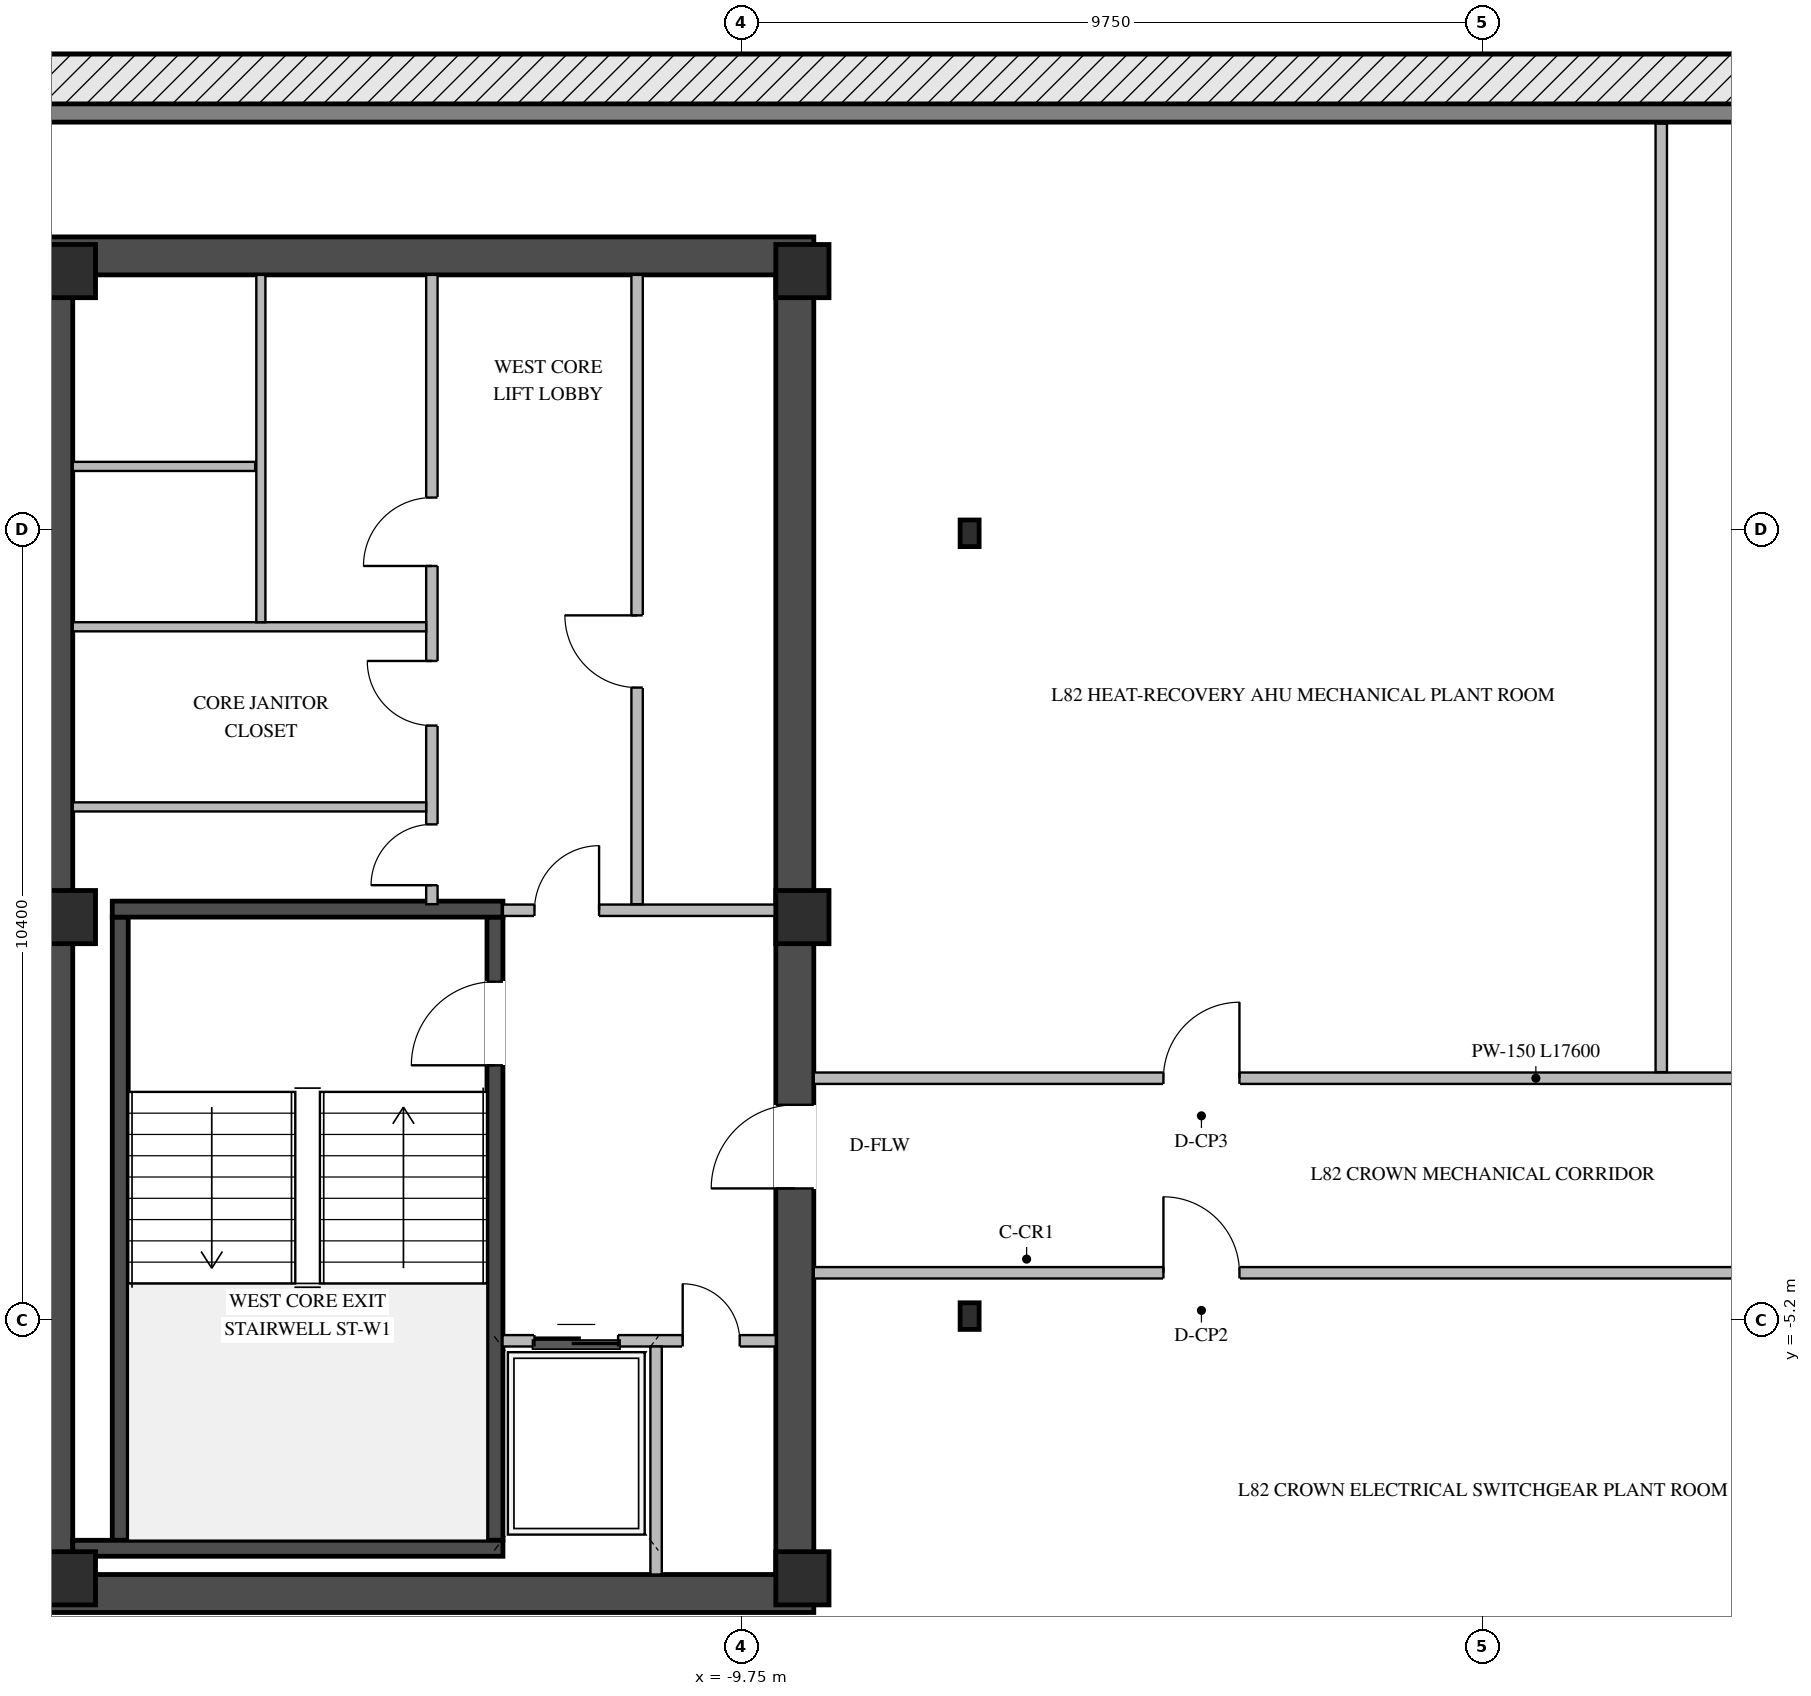
"""IFC4 building model, lengths in metres.
Left out: names, types, materials, properties, quantities, classifications, styles, units other than length and angle.
Written with IfcOpenShell. Run it as: python <this file> out.ifc"""

import sys

from ifc_helpers import new_model, si_unit, direction, frame, frame_2d, origin, origin_2d, place, context, subcontext, project, spatial, rectangle, i_section, extrude, element, fill, save


model = new_model("IFC4")
c1 = context("Model", 3, precision=1e-05, world=origin(), true_north=direction((0.0, 1.0)))
c2 = subcontext(c1, "Body", "Model", "MODEL_VIEW")
j1 = project(units=[si_unit("LENGTHUNIT", "METRE"), si_unit("PLANEANGLEUNIT", "RADIAN")], contexts=[c1])
p1 = place(None, origin())
s1 = spatial("IfcSite", under=j1, at=p1, CompositionType="ELEMENT")
p2 = place(p1, origin())
s2 = spatial("IfcBuilding", under=s1, at=p2, CompositionType="ELEMENT")
p3 = place(p2, frame((0.0, 0.0, 301.35)))
s3 = spatial("IfcBuildingStorey", under=s2, at=p3, CompositionType="ELEMENT", Elevation=301.35)
for number, where, z_axis, x_axis in (
    (1, (-19.05, -8.8, 0.0), (0.0, 0.0, 1.0), (1.0, 0.0, 0.0)),
    (2, (-19.05, 8.8, 0.0), (0.0, 0.0, 1.0), (1.0, 0.0, 0.0)),
):
    element("IfcWall", number, at=place(p3, frame(where, z_axis=z_axis, x_axis=x_axis)), inside=s3, PredefinedType="SHEAR", context=c2, shape_type="SweptSolid", body=[
        extrude(rectangle(XDim=10.25, YDim=0.5, at=frame_2d((5.125, 0.0))), origin(), (0.0, 0.0, 1.0), 3.35),
    ])
p4 = place(p3, frame((-18.8, -8.55, 0.0), z_axis=(0.0, 0.0, 1.0), x_axis=(0.0, 1.0, 0.0)))
e3 = element("IfcWall", 3, at=p4, inside=s3, PredefinedType="SHEAR", context=c2, shape_type="SweptSolid", body=[
    extrude(rectangle(XDim=17.1, YDim=0.5, at=frame_2d((8.55, 0.0))), origin(), (0.0, 0.0, 1.0), 3.35),
])
p5 = place(p3, frame((-9.05, -8.55, 0.0), z_axis=(0.0, 0.0, 1.0), x_axis=(0.0, 1.0, 0.0)))
e4 = element("IfcWall", 4, at=p5, inside=s3, PredefinedType="SHEAR", context=c2, shape_type="SweptSolid", body=[
    extrude(rectangle(XDim=17.1, YDim=0.5, at=frame_2d((8.55, 0.0))), origin(), (0.0, 0.0, 1.0), 3.35),
])
p6 = place(p5, frame((5.08, 0.0, 0.0)))
e5 = element("IfcOpeningElement", 5, at=p6, cuts=e4, PredefinedType="OPENING", context=c2, shape_type="SweptSolid", body=[
    extrude(rectangle(XDim=1.1, YDim=2.08, at=frame_2d((0.55, 1.04))), frame((0.0, 0.26, 0.0), z_axis=(0.0, -1.0, 0.0), x_axis=(1.0, 0.0, 0.0)), (0.0, 0.0, 1.0), 0.52),
])
p7 = place(p3, frame((-12.995, -8.1, 0.0), z_axis=(0.0, 0.0, 1.0), x_axis=(0.0, 1.0, 0.0)))
e6 = element("IfcWall", 6, at=p7, inside=s3, PredefinedType="SHEAR", context=c2, shape_type="SweptSolid", body=[
    extrude(rectangle(XDim=8.2, YDim=0.21, at=frame_2d((4.1, 0.0))), origin(), (0.0, 0.0, 1.0), 3.35),
])
p8 = place(p7, frame((6.25, 0.0, 0.0)))
e7 = element("IfcOpeningElement", 7, at=p8, cuts=e6, PredefinedType="OPENING", context=c2, shape_type="SweptSolid", body=[
    extrude(rectangle(XDim=1.1, YDim=2.15, at=frame_2d((0.55, 1.075))), frame((0.0, 0.115, 0.0), z_axis=(0.0, -1.0, 0.0), x_axis=(1.0, 0.0, 0.0)), (0.0, 0.0, 1.0), 0.23),
])
p9 = place(p3, frame((-17.925, -8.1, 0.0), z_axis=(0.0, 0.0, 1.0), x_axis=(0.0, 1.0, 0.0)))
e8 = element("IfcWall", 8, at=p9, inside=s3, PredefinedType="SHEAR", context=c2, shape_type="SweptSolid", body=[
    extrude(rectangle(XDim=8.2, YDim=0.21, at=frame_2d((4.1, 0.0))), origin(), (0.0, 0.0, 1.0), 3.35),
])
p10 = place(p3, frame((-18.55, -8.205, 0.0), z_axis=(0.0, 0.0, 1.0), x_axis=(1.0, 0.0, 0.0)))
e9 = element("IfcWall", 9, at=p10, inside=s3, PredefinedType="SHEAR", context=c2, shape_type="SweptSolid", body=[
    extrude(rectangle(XDim=5.66, YDim=0.21, at=frame_2d((2.83, 0.0))), origin(), (0.0, 0.0, 1.0), 3.35),
])
p11 = place(p3, frame((-12.89, 0.205, 0.0), z_axis=(0.0, 0.0, 1.0), x_axis=(-1.0, 0.0, 0.0)))
e10 = element("IfcWall", 10, at=p11, inside=s3, PredefinedType="SHEAR", context=c2, shape_type="SweptSolid", body=[
    extrude(rectangle(XDim=5.14, YDim=0.21, at=frame_2d((2.57, 0.0))), origin(), (0.0, 0.0, 1.0), 3.35),
])
for number, where, z_axis, x_axis in (
    (11, (-8.95, -8.6, 0.0), (0.0, 0.0, 1.0), (1.0, 0.0, 0.0)),
    (12, (-8.95, 0.1, 0.0), (0.0, 0.0, 1.0), (1.0, 0.0, 0.0)),
    (13, (-8.95, 8.6, 0.0), (0.0, 0.0, 1.0), (1.0, 0.0, 0.0)),
    (14, (-18.6, -8.6, 0.0), (0.0, 0.0, 1.0), (1.0, 0.0, 0.0)),
    (15, (-18.6, 0.1, 0.0), (0.0, 0.0, 1.0), (1.0, 0.0, 0.0)),
    (16, (-18.6, 8.6, 0.0), (0.0, 0.0, 1.0), (1.0, 0.0, 0.0)),
):
    element("IfcColumn", number, at=place(p3, frame(where, z_axis=z_axis, x_axis=x_axis)), inside=s3, PredefinedType="COLUMN", context=c2, shape_type="SweptSolid", body=[
        extrude(rectangle(XDim=0.7, YDim=0.7, at=origin_2d()), origin(), (0.0, 0.0, 1.0), 3.6),
    ])
for number, where, z_axis, x_axis in (
    (17, (-6.75, -5.15, 0.0), (0.0, 0.0, 1.0), (1.0, 0.0, 0.0)),
    (18, (-6.75, 5.15, 0.0), (0.0, 0.0, 1.0), (1.0, 0.0, 0.0)),
):
    element("IfcColumn", number, at=place(p3, frame(where, z_axis=z_axis, x_axis=x_axis)), inside=s3, PredefinedType="COLUMN", context=c2, shape_type="SweptSolid", body=[
        extrude(i_section(OverallWidth=0.25, OverallDepth=0.35, WebThickness=0.01, FlangeThickness=0.012, at=origin_2d()), origin(), (0.0, 0.0, 1.0), 3.6),
    ])
p12 = place(p3, frame((21.16, 10.68, 0.0), z_axis=(0.0, 0.0, 1.0), x_axis=(-1.0, 0.0, 0.0)))
e19 = element("IfcWall", 19, at=p12, inside=s3, PredefinedType="STANDARD", context=c2, shape_type="SweptSolid", body=[
    extrude(rectangle(XDim=41.32, YDim=0.24, at=frame_2d((20.66, 0.0))), origin(), (0.0, 0.0, 1.0), 3.33),
])
p13 = place(p3, frame((-20.35, 11.58, 0.0), z_axis=(0.0, 0.0, 1.0), x_axis=(1.0, 0.0, 0.0)))
e20 = element("IfcWall", 20, at=p13, inside=s3, PredefinedType="PARAPET", context=c2, shape_type="SweptSolid", body=[
    extrude(rectangle(XDim=42.7, YDim=0.25, at=frame_2d((21.35, 0.0))), origin(), (0.0, 0.0, 1.0), 1.2),
])
p14 = place(p3, frame((-12.895, -5.475, 0.0), z_axis=(0.0, 0.0, 1.0), x_axis=(1.0, 0.0, 0.0)))
e21 = element("IfcWall", 21, at=p14, inside=s3, PredefinedType="STANDARD", context=c2, shape_type="SweptSolid", body=[
    extrude(rectangle(XDim=3.595, YDim=0.15, at=frame_2d((1.797, 0.0))), origin(), (0.0, 0.0, 1.0), 3.33),
])
p15 = place(p14, frame((0.42, 0.0, 0.0)))
e22 = element("IfcOpeningElement", 22, at=p15, cuts=e21, PredefinedType="OPENING", context=c2, shape_type="SweptSolid", body=[
    extrude(rectangle(XDim=1.1, YDim=2.15, at=frame_2d((0.55, 1.075))), frame((0.0, 0.085, 0.0), z_axis=(0.0, -1.0, 0.0), x_axis=(1.0, 0.0, 0.0)), (0.0, 0.0, 1.0), 0.17),
])
p16 = place(p14, frame((2.37, 0.0, 0.0)))
e23 = element("IfcOpeningElement", 23, at=p16, cuts=e21, PredefinedType="OPENING", context=c2, shape_type="SweptSolid", body=[
    extrude(rectangle(XDim=0.75, YDim=2.05, at=frame_2d((0.375, 1.025))), frame((0.0, 0.085, 0.0), z_axis=(0.0, -1.0, 0.0), x_axis=(1.0, 0.0, 0.0)), (0.0, 0.0, 1.0), 0.17),
])
p17 = place(p3, frame((-10.875, -8.55, 0.0), z_axis=(0.0, 0.0, 1.0), x_axis=(0.0, 1.0, 0.0)))
e24 = element("IfcWall", 24, at=p17, inside=s3, PredefinedType="STANDARD", context=c2, shape_type="SweptSolid", body=[
    extrude(rectangle(XDim=3.0, YDim=0.15, at=frame_2d((1.5, 0.0))), origin(), (0.0, 0.0, 1.0), 3.33),
])
p18 = place(p3, frame((-12.89, 0.19, 0.0), z_axis=(0.0, 0.0, 1.0), x_axis=(1.0, 0.0, 0.0)))
e25 = element("IfcWall", 25, at=p18, inside=s3, PredefinedType="STANDARD", context=c2, shape_type="SweptSolid", body=[
    extrude(rectangle(XDim=3.59, YDim=0.15, at=frame_2d((1.795, 0.0))), origin(), (0.0, 0.0, 1.0), 2.825),
])
p19 = place(p18, frame((0.415, 0.0, 0.0)))
e26 = element("IfcOpeningElement", 26, at=p19, cuts=e25, PredefinedType="OPENING", context=c2, shape_type="SweptSolid", body=[
    extrude(rectangle(XDim=0.85, YDim=2.04, at=frame_2d((0.425, 1.02))), frame((0.0, 0.085, 0.0), z_axis=(0.0, -1.0, 0.0), x_axis=(1.0, 0.0, 0.0)), (0.0, 0.0, 1.0), 0.17),
])
p20 = place(p3, frame((-11.125, 0.27, 0.0), z_axis=(0.0, 0.0, 1.0), x_axis=(0.0, 1.0, 0.0)))
e27 = element("IfcWall", 27, at=p20, inside=s3, PredefinedType="STANDARD", context=c2, shape_type="SweptSolid", body=[
    extrude(rectangle(XDim=8.28, YDim=0.15, at=frame_2d((4.14, 0.0))), origin(), (0.0, 0.0, 1.0), 3.33),
])
p21 = place(p20, frame((2.85, 0.0, 0.0)))
e28 = element("IfcOpeningElement", 28, at=p21, cuts=e27, PredefinedType="OPENING", context=c2, shape_type="SweptSolid", body=[
    extrude(rectangle(XDim=0.95, YDim=2.05, at=frame_2d((0.475, 1.025))), frame((0.0, 0.085, 0.0), z_axis=(0.0, -1.0, 0.0), x_axis=(1.0, 0.0, 0.0)), (0.0, 0.0, 1.0), 0.17),
])
p22 = place(p3, frame((-13.825, 0.27, 0.0), z_axis=(0.0, 0.0, 1.0), x_axis=(0.0, 1.0, 0.0)))
e29 = element("IfcWall", 29, at=p22, inside=s3, PredefinedType="STANDARD", context=c2, shape_type="SweptSolid", body=[
    extrude(rectangle(XDim=8.28, YDim=0.15, at=frame_2d((4.14, 0.0))), origin(), (0.0, 0.0, 1.0), 3.33),
])
p23 = place(p22, frame((4.45, 0.0, 0.0)))
e30 = element("IfcOpeningElement", 30, at=p23, cuts=e29, PredefinedType="OPENING", context=c2, shape_type="SweptSolid", body=[
    extrude(rectangle(XDim=0.9, YDim=2.05, at=frame_2d((0.45, 1.025))), frame((0.0, 0.085, 0.0), z_axis=(0.0, -1.0, 0.0), x_axis=(1.0, 0.0, 0.0)), (0.0, 0.0, 1.0), 0.17),
])
p24 = place(p22, frame((0.25, 0.0, 0.0)))
e31 = element("IfcOpeningElement", 31, at=p24, cuts=e29, PredefinedType="OPENING", context=c2, shape_type="SweptSolid", body=[
    extrude(rectangle(XDim=0.8, YDim=2.05, at=frame_2d((0.4, 1.025))), frame((0.0, 0.085, 0.0), z_axis=(0.0, -1.0, 0.0), x_axis=(1.0, 0.0, 0.0)), (0.0, 0.0, 1.0), 0.17),
])
p25 = place(p22, frame((2.35, 0.0, 0.0)))
e32 = element("IfcOpeningElement", 32, at=p25, cuts=e29, PredefinedType="OPENING", context=c2, shape_type="SweptSolid", body=[
    extrude(rectangle(XDim=0.85, YDim=2.05, at=frame_2d((0.425, 1.025))), frame((0.0, 0.085, 0.0), z_axis=(0.0, -1.0, 0.0), x_axis=(1.0, 0.0, 0.0)), (0.0, 0.0, 1.0), 0.17),
])
p26 = place(p3, frame((-18.55, 3.92, 0.0), z_axis=(0.0, 0.0, 1.0), x_axis=(1.0, 0.0, 0.0)))
e33 = element("IfcWall", 33, at=p26, inside=s3, PredefinedType="STANDARD", context=c2, shape_type="SweptSolid", body=[
    extrude(rectangle(XDim=4.65, YDim=0.12, at=frame_2d((2.325, 0.0))), origin(), (0.0, 0.0, 1.0), 3.33),
])
p27 = place(p3, frame((-18.55, 6.03, 0.0), z_axis=(0.0, 0.0, 1.0), x_axis=(1.0, 0.0, 0.0)))
e34 = element("IfcWall", 34, at=p27, inside=s3, PredefinedType="STANDARD", context=c2, shape_type="SweptSolid", body=[
    extrude(rectangle(XDim=2.4, YDim=0.12, at=frame_2d((1.2, 0.0))), origin(), (0.0, 0.0, 1.0), 3.33),
])
p28 = place(p3, frame((-16.075, 3.98, 0.0), z_axis=(0.0, 0.0, 1.0), x_axis=(0.0, 1.0, 0.0)))
e35 = element("IfcWall", 35, at=p28, inside=s3, PredefinedType="STANDARD", context=c2, shape_type="SweptSolid", body=[
    extrude(rectangle(XDim=4.57, YDim=0.12, at=frame_2d((2.285, 0.0))), origin(), (0.0, 0.0, 1.0), 3.33),
])
p29 = place(p3, frame((-18.55, 1.55, 0.0), z_axis=(0.0, 0.0, 1.0), x_axis=(1.0, 0.0, 0.0)))
e36 = element("IfcWall", 36, at=p29, inside=s3, PredefinedType="STANDARD", context=c2, shape_type="SweptSolid", body=[
    extrude(rectangle(XDim=4.65, YDim=0.12, at=frame_2d((2.325, 0.0))), origin(), (0.0, 0.0, 1.0), 3.33),
])
p30 = place(p3, frame((-8.8, -2.02, 0.0), z_axis=(0.0, 0.0, 1.0), x_axis=(1.0, 0.0, 0.0)))
e37 = element("IfcWall", 37, at=p30, inside=s3, PredefinedType="STANDARD", context=c2, shape_type="SweptSolid", body=[
    extrude(rectangle(XDim=17.6, YDim=0.15, at=frame_2d((8.8, 0.0))), origin(), (0.0, 0.0, 1.0), 3.33),
])
p31 = place(p30, frame((4.6, 0.0, 0.0)))
e38 = element("IfcOpeningElement", 38, at=p31, cuts=e37, PredefinedType="OPENING", context=c2, shape_type="SweptSolid", body=[
    extrude(rectangle(XDim=1.0, YDim=2.02, at=frame_2d((0.5, 1.01))), frame((0.0, 0.085, 0.0), z_axis=(0.0, -1.0, 0.0), x_axis=(1.0, 0.0, 0.0)), (0.0, 0.0, 1.0), 0.17),
])
p32 = place(p30, frame((13.4, 0.0, 0.0)))
e39 = element("IfcOpeningElement", 39, at=p32, cuts=e37, PredefinedType="OPENING", context=c2, shape_type="SweptSolid", body=[
    extrude(rectangle(XDim=1.0, YDim=2.02, at=frame_2d((0.5, 1.01))), frame((0.0, 0.085, 0.0), z_axis=(0.0, -1.0, 0.0), x_axis=(1.0, 0.0, 0.0)), (0.0, 0.0, 1.0), 0.17),
])
p33 = place(p3, frame((2.35, -1.94, 0.0), z_axis=(0.0, 0.0, 1.0), x_axis=(0.0, 1.0, 0.0)))
e40 = element("IfcWall", 40, at=p33, inside=s3, PredefinedType="STANDARD", context=c2, shape_type="SweptSolid", body=[
    extrude(rectangle(XDim=12.48, YDim=0.15, at=frame_2d((6.24, 0.0))), origin(), (0.0, 0.0, 1.0), 3.33),
])
p34 = place(p3, frame((-8.8, -4.58, 0.0), z_axis=(0.0, 0.0, 1.0), x_axis=(1.0, 0.0, 0.0)))
e41 = element("IfcWall", 41, at=p34, inside=s3, PredefinedType="STANDARD", context=c2, shape_type="SweptSolid", body=[
    extrude(rectangle(XDim=17.6, YDim=0.15, at=frame_2d((8.8, 0.0))), origin(), (0.0, 0.0, 1.0), 3.33),
])
p35 = place(p34, frame((4.6, 0.0, 0.0)))
e42 = element("IfcOpeningElement", 42, at=p35, cuts=e41, PredefinedType="OPENING", context=c2, shape_type="SweptSolid", body=[
    extrude(rectangle(XDim=1.0, YDim=2.02, at=frame_2d((0.5, 1.01))), frame((0.0, 0.085, 0.0), z_axis=(0.0, -1.0, 0.0), x_axis=(1.0, 0.0, 0.0)), (0.0, 0.0, 1.0), 0.17),
])
p36 = place(p8, origin())
e43 = element("IfcDoor", 43, at=p36, inside=s3, OperationType="SINGLE_SWING_LEFT", PredefinedType="DOOR", context=c2, shape_type="SweptSolid", body=[
    extrude(rectangle(XDim=1.1, YDim=2.15, at=frame_2d((0.55, 1.075))), frame((0.0, 0.025, 0.0), z_axis=(0.0, -1.0, 0.0), x_axis=(1.0, 0.0, 0.0)), (0.0, 0.0, 1.0), 0.05),
])
fill(e7, e43)
p37 = place(p15, origin())
e44 = element("IfcDoor", 44, at=p37, inside=s3, OperationType="DOUBLE_DOOR_SLIDING", PredefinedType="DOOR", context=c2, shape_type="SweptSolid", body=[
    extrude(rectangle(XDim=1.1, YDim=2.15, at=frame_2d((0.55, 1.075))), frame((0.0, 0.025, 0.0), z_axis=(0.0, -1.0, 0.0), x_axis=(1.0, 0.0, 0.0)), (0.0, 0.0, 1.0), 0.05),
])
fill(e22, e44)
p38 = place(p16, origin())
e45 = element("IfcDoor", 45, at=p38, inside=s3, OperationType="SINGLE_SWING_LEFT", PredefinedType="DOOR", context=c2, shape_type="SweptSolid", body=[
    extrude(rectangle(XDim=0.75, YDim=2.05, at=frame_2d((0.375, 1.025))), frame((0.0, 0.025, 0.0), z_axis=(0.0, -1.0, 0.0), x_axis=(1.0, 0.0, 0.0)), (0.0, 0.0, 1.0), 0.05),
])
fill(e23, e45)
p39 = place(p19, origin())
e46 = element("IfcDoor", 46, at=p39, inside=s3, OperationType="SINGLE_SWING_RIGHT", PredefinedType="DOOR", context=c2, shape_type="SweptSolid", body=[
    extrude(rectangle(XDim=0.85, YDim=2.04, at=frame_2d((0.425, 1.02))), frame((0.0, 0.025, 0.0), z_axis=(0.0, -1.0, 0.0), x_axis=(1.0, 0.0, 0.0)), (0.0, 0.0, 1.0), 0.05),
])
fill(e26, e46)
p40 = place(p6, origin())
e47 = element("IfcDoor", 47, at=p40, inside=s3, OperationType="SINGLE_SWING_LEFT", PredefinedType="DOOR", context=c2, shape_type="SweptSolid", body=[
    extrude(rectangle(XDim=1.1, YDim=2.08, at=frame_2d((0.55, 1.04))), frame((0.0, 0.205, 0.0), z_axis=(0.0, -1.0, 0.0), x_axis=(1.0, 0.0, 0.0)), (0.0, 0.0, 1.0), 0.05),
])
fill(e5, e47)
p41 = place(p21, origin())
e48 = element("IfcDoor", 48, at=p41, inside=s3, OperationType="SINGLE_SWING_RIGHT", PredefinedType="DOOR", context=c2, shape_type="SweptSolid", body=[
    extrude(rectangle(XDim=0.95, YDim=2.05, at=frame_2d((0.475, 1.025))), frame((0.0, 0.025, 0.0), z_axis=(0.0, -1.0, 0.0), x_axis=(1.0, 0.0, 0.0)), (0.0, 0.0, 1.0), 0.05),
])
fill(e28, e48)
p42 = place(p23, origin())
e49 = element("IfcDoor", 49, at=p42, inside=s3, OperationType="SINGLE_SWING_LEFT", PredefinedType="DOOR", context=c2, shape_type="SweptSolid", body=[
    extrude(rectangle(XDim=0.9, YDim=2.05, at=frame_2d((0.45, 1.025))), frame((0.0, 0.025, 0.0), z_axis=(0.0, -1.0, 0.0), x_axis=(1.0, 0.0, 0.0)), (0.0, 0.0, 1.0), 0.05),
])
fill(e30, e49)
p43 = place(p24, origin())
e50 = element("IfcDoor", 50, at=p43, inside=s3, OperationType="SINGLE_SWING_LEFT", PredefinedType="DOOR", context=c2, shape_type="SweptSolid", body=[
    extrude(rectangle(XDim=0.8, YDim=2.05, at=frame_2d((0.4, 1.025))), frame((0.0, 0.025, 0.0), z_axis=(0.0, -1.0, 0.0), x_axis=(1.0, 0.0, 0.0)), (0.0, 0.0, 1.0), 0.05),
])
fill(e31, e50)
p44 = place(p25, origin())
e51 = element("IfcDoor", 51, at=p44, inside=s3, OperationType="SINGLE_SWING_RIGHT", PredefinedType="DOOR", context=c2, shape_type="SweptSolid", body=[
    extrude(rectangle(XDim=0.85, YDim=2.05, at=frame_2d((0.425, 1.025))), frame((0.0, 0.025, 0.0), z_axis=(0.0, -1.0, 0.0), x_axis=(1.0, 0.0, 0.0)), (0.0, 0.0, 1.0), 0.05),
])
fill(e32, e51)
p45 = place(p31, origin())
e52 = element("IfcDoor", 52, at=p45, inside=s3, OperationType="SINGLE_SWING_RIGHT", PredefinedType="DOOR", context=c2, shape_type="SweptSolid", body=[
    extrude(rectangle(XDim=1.0, YDim=2.02, at=frame_2d((0.5, 1.01))), frame((0.0, 0.025, 0.0), z_axis=(0.0, -1.0, 0.0), x_axis=(1.0, 0.0, 0.0)), (0.0, 0.0, 1.0), 0.05),
])
fill(e38, e52)
p46 = place(p35, origin())
e53 = element("IfcDoor", 53, at=p46, inside=s3, OperationType="SINGLE_SWING_LEFT", PredefinedType="DOOR", context=c2, shape_type="SweptSolid", body=[
    extrude(rectangle(XDim=1.0, YDim=2.02, at=frame_2d((0.5, 1.01))), frame((0.0, 0.025, 0.0), z_axis=(0.0, -1.0, 0.0), x_axis=(1.0, 0.0, 0.0)), (0.0, 0.0, 1.0), 0.05),
])
fill(e42, e53)
save(model, sys.argv[1])
